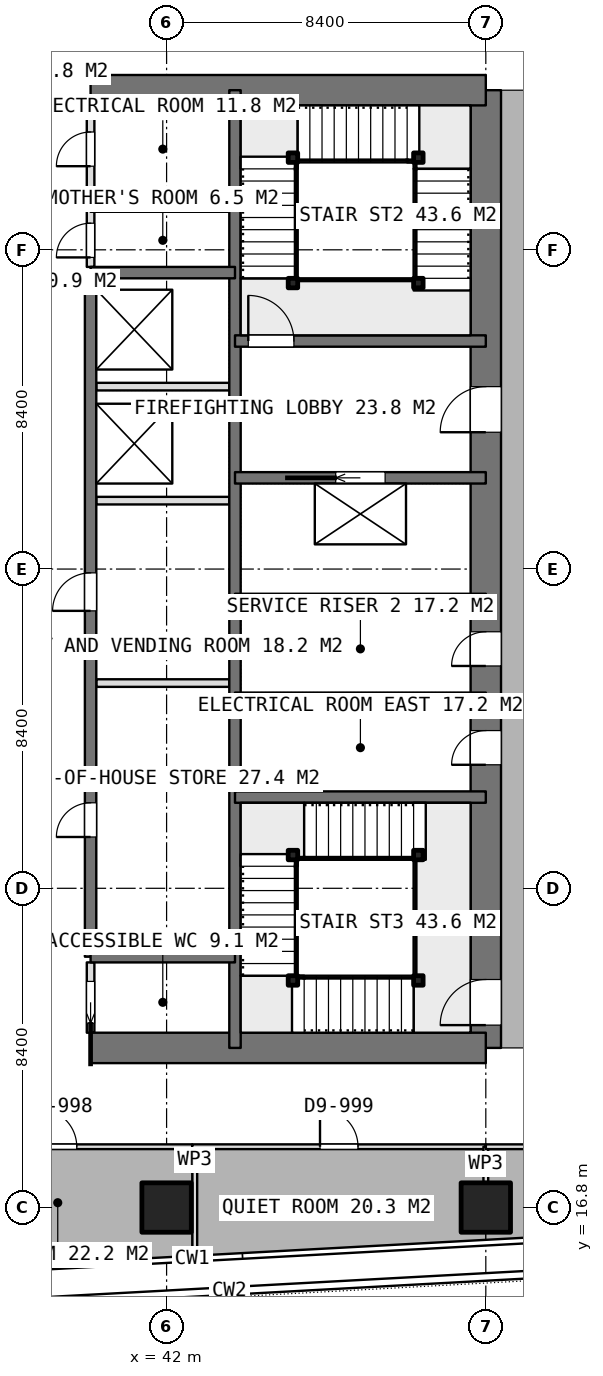
"""IFC4 building model, lengths in metres.
Left out: names, types, materials, properties, quantities, classifications, styles, units other than length and angle.
Written with IfcOpenShell. Run it as: python <this file> out.ifc"""

import sys

from ifc_helpers import new_model, si_unit, direction, frame, frame_2d, origin, origin_2d, place, context, subcontext, project, spatial, rectangle, extrude, element, fill, save


model = new_model("IFC4")
c1 = context("Model", 3, precision=1e-05, world=origin(), true_north=direction((0.0, 1.0)))
c2 = subcontext(c1, "Body", "Model", "MODEL_VIEW")
j1 = project(units=[si_unit("LENGTHUNIT", "METRE"), si_unit("PLANEANGLEUNIT", "RADIAN")], contexts=[c1])
p1 = place(None, origin())
s1 = spatial("IfcSite", under=j1, at=p1, CompositionType="ELEMENT")
p2 = place(p1, origin())
s2 = spatial("IfcBuilding", under=s1, at=p2, CompositionType="ELEMENT")
p3 = place(p2, frame((0.0, 0.0, 268.85)))
s3 = spatial("IfcBuildingStorey", under=s2, at=p3, CompositionType="ELEMENT", Elevation=268.85)
for number, where, z_axis, x_axis in (
    (1, (40.0, 21.0, 0.0), (0.0, 0.0, 1.0), (1.0, 0.0, 0.0)),
    (2, (40.0, 46.2, 0.0), (0.0, 0.0, 1.0), (1.0, 0.0, 0.0)),
):
    element("IfcWall", number, at=place(p3, frame(where, z_axis=z_axis, x_axis=x_axis)), inside=s3, PredefinedType="SHEAR", context=c2, shape_type="SweptSolid", body=[
        extrude(rectangle(XDim=10.4, YDim=0.8, at=frame_2d((5.2, 0.0))), origin(), (0.0, 0.0, 1.0), 3.75),
    ])
p4 = place(p3, frame((50.4, 21.0, 0.0), z_axis=(0.0, 0.0, 1.0), x_axis=(0.0, 1.0, 0.0)))
e3 = element("IfcWall", 3, at=p4, inside=s3, PredefinedType="SHEAR", context=c2, shape_type="SweptSolid", body=[
    extrude(rectangle(XDim=25.2, YDim=0.8, at=frame_2d((12.6, 0.0))), origin(), (0.0, 0.0, 1.0), 3.75),
])
p5 = place(p4, frame((16.2, 0.0, 0.0)))
e4 = element("IfcOpeningElement", 4, at=p5, cuts=e3, PredefinedType="OPENING", context=c2, shape_type="SweptSolid", body=[
    extrude(rectangle(XDim=1.2, YDim=2.1, at=frame_2d((0.6, 1.05))), frame((0.0, 0.41, 0.0), z_axis=(0.0, -1.0, 0.0), x_axis=(1.0, 0.0, 0.0)), (0.0, 0.0, 1.0), 0.82),
])
p6 = place(p4, frame((10.05, 0.0, 0.0)))
e5 = element("IfcOpeningElement", 5, at=p6, cuts=e3, PredefinedType="OPENING", context=c2, shape_type="SweptSolid", body=[
    extrude(rectangle(XDim=0.9, YDim=2.1, at=frame_2d((0.45, 1.05))), frame((0.0, 0.41, 0.0), z_axis=(0.0, -1.0, 0.0), x_axis=(1.0, 0.0, 0.0)), (0.0, 0.0, 1.0), 0.82),
])
p7 = place(p4, frame((7.45, 0.0, 0.0)))
e6 = element("IfcOpeningElement", 6, at=p7, cuts=e3, PredefinedType="OPENING", context=c2, shape_type="SweptSolid", body=[
    extrude(rectangle(XDim=0.9, YDim=2.1, at=frame_2d((0.45, 1.05))), frame((0.0, 0.41, 0.0), z_axis=(0.0, -1.0, 0.0), x_axis=(1.0, 0.0, 0.0)), (0.0, 0.0, 1.0), 0.82),
])
p8 = place(p4, frame((0.6, 0.0, 0.0)))
e7 = element("IfcOpeningElement", 7, at=p8, cuts=e3, PredefinedType="OPENING", context=c2, shape_type="SweptSolid", body=[
    extrude(rectangle(XDim=1.2, YDim=2.1, at=frame_2d((0.6, 1.05))), frame((0.0, 0.41, 0.0), z_axis=(0.0, -1.0, 0.0), x_axis=(1.0, 0.0, 0.0)), (0.0, 0.0, 1.0), 0.82),
])
p9 = place(p3, frame((43.8, 21.0, 0.0), z_axis=(0.0, 0.0, 1.0), x_axis=(0.0, 1.0, 0.0)))
e8 = element("IfcWall", 8, at=p9, inside=s3, PredefinedType="SHEAR", context=c2, shape_type="SweptSolid", body=[
    extrude(rectangle(XDim=25.2, YDim=0.3, at=frame_2d((12.6, 0.0))), origin(), (0.0, 0.0, 1.0), 3.75),
])
p10 = place(p3, frame((40.0, 23.4, 0.0), z_axis=(0.0, 0.0, 1.0), x_axis=(0.0, 1.0, 0.0)))
e9 = element("IfcWall", 9, at=p10, inside=s3, PredefinedType="SHEAR", context=c2, shape_type="SweptSolid", body=[
    extrude(rectangle(XDim=18.0, YDim=0.3, at=frame_2d((9.0, 0.0))), origin(), (0.0, 0.0, 1.0), 3.75),
])
p11 = place(p10, frame((3.15, 0.0, 0.0)))
e10 = element("IfcOpeningElement", 10, at=p11, cuts=e9, PredefinedType="OPENING", context=c2, shape_type="SweptSolid", body=[
    extrude(rectangle(XDim=0.9, YDim=2.1, at=frame_2d((0.45, 1.05))), frame((0.0, 0.16, 0.0), z_axis=(0.0, -1.0, 0.0), x_axis=(1.0, 0.0, 0.0)), (0.0, 0.0, 1.0), 0.32),
])
p12 = place(p10, frame((9.1, 0.0, 0.0)))
e11 = element("IfcOpeningElement", 11, at=p12, cuts=e9, PredefinedType="OPENING", context=c2, shape_type="SweptSolid", body=[
    extrude(rectangle(XDim=1.0, YDim=2.1, at=frame_2d((0.5, 1.05))), frame((0.0, 0.16, 0.0), z_axis=(0.0, -1.0, 0.0), x_axis=(1.0, 0.0, 0.0)), (0.0, 0.0, 1.0), 0.32),
])
for number, where, z_axis, x_axis in (
    (12, (40.0, 23.4, 0.0), (0.0, 0.0, 1.0), (1.0, 0.0, 0.0)),
    (13, (40.0, 41.4, 0.0), (0.0, 0.0, 1.0), (1.0, 0.0, 0.0)),
):
    element("IfcWall", number, at=place(p3, frame(where, z_axis=z_axis, x_axis=x_axis)), inside=s3, PredefinedType="SHEAR", context=c2, shape_type="SweptSolid", body=[
        extrude(rectangle(XDim=3.8, YDim=0.3, at=frame_2d((1.9, 0.0))), origin(), (0.0, 0.0, 1.0), 3.75),
    ])
for number, where, z_axis, x_axis in (
    (14, (43.8, 27.6, 0.0), (0.0, 0.0, 1.0), (1.0, 0.0, 0.0)),
    (15, (43.8, 30.2, 0.0), (0.0, 0.0, 1.0), (1.0, 0.0, 0.0)),
    (16, (43.8, 32.8, 0.0), (0.0, 0.0, 1.0), (1.0, 0.0, 0.0)),
):
    element("IfcWall", number, at=place(p3, frame(where, z_axis=z_axis, x_axis=x_axis)), inside=s3, PredefinedType="SHEAR", context=c2, shape_type="SweptSolid", body=[
        extrude(rectangle(XDim=6.6, YDim=0.3, at=frame_2d((3.3, 0.0))), origin(), (0.0, 0.0, 1.0), 3.75),
    ])
p13 = place(p3, frame((43.8, 36.0, 0.0), z_axis=(0.0, 0.0, 1.0), x_axis=(1.0, 0.0, 0.0)))
e17 = element("IfcWall", 17, at=p13, inside=s3, PredefinedType="SHEAR", context=c2, shape_type="SweptSolid", body=[
    extrude(rectangle(XDim=6.6, YDim=0.3, at=frame_2d((3.3, 0.0))), origin(), (0.0, 0.0, 1.0), 3.75),
])
p14 = place(p13, frame((2.65, 0.0, 0.0)))
e18 = element("IfcOpeningElement", 18, at=p14, cuts=e17, PredefinedType="OPENING", context=c2, shape_type="SweptSolid", body=[
    extrude(rectangle(XDim=1.3, YDim=2.1, at=frame_2d((0.65, 1.05))), frame((0.0, 0.16, 0.0), z_axis=(0.0, -1.0, 0.0), x_axis=(1.0, 0.0, 0.0)), (0.0, 0.0, 1.0), 0.32),
])
p15 = place(p3, frame((43.8, 39.6, 0.0), z_axis=(0.0, 0.0, 1.0), x_axis=(1.0, 0.0, 0.0)))
e19 = element("IfcWall", 19, at=p15, inside=s3, PredefinedType="SHEAR", context=c2, shape_type="SweptSolid", body=[
    extrude(rectangle(XDim=6.6, YDim=0.3, at=frame_2d((3.3, 0.0))), origin(), (0.0, 0.0, 1.0), 3.75),
])
p16 = place(p15, frame((0.35, 0.0, 0.0)))
e20 = element("IfcOpeningElement", 20, at=p16, cuts=e19, PredefinedType="OPENING", context=c2, shape_type="SweptSolid", body=[
    extrude(rectangle(XDim=1.2, YDim=2.1, at=frame_2d((0.6, 1.05))), frame((0.0, 0.16, 0.0), z_axis=(0.0, -1.0, 0.0), x_axis=(1.0, 0.0, 0.0)), (0.0, 0.0, 1.0), 0.32),
])
for number, where, z_axis, x_axis in (
    (21, (42.0, 16.8, 0.0), (0.0, 0.0, 1.0), (1.0, 0.0, 0.0)),
    (22, (50.4, 16.8, 0.0), (0.0, 0.0, 1.0), (1.0, 0.0, 0.0)),
):
    element("IfcColumn", number, at=place(p3, frame(where, z_axis=z_axis, x_axis=x_axis)), inside=s3, PredefinedType="COLUMN", context=c2, shape_type="SweptSolid", body=[
        extrude(rectangle(XDim=1.3, YDim=1.3, at=origin_2d()), origin(), (0.0, 0.0, 1.0), 3.75),
    ])
for number, where, z_axis, x_axis in (
    (23, (40.15, 35.4, 0.0), (0.0, 0.0, 1.0), (1.0, 0.0, 0.0)),
    (24, (40.15, 38.4, 0.0), (0.0, 0.0, 1.0), (1.0, 0.0, 0.0)),
):
    element("IfcWall", number, at=place(p3, frame(where, z_axis=z_axis, x_axis=x_axis)), inside=s3, PredefinedType="PARTITIONING", context=c2, shape_type="SweptSolid", body=[
        extrude(rectangle(XDim=3.5, YDim=0.2, at=frame_2d((1.75, 0.0))), origin(), (0.0, 0.0, 1.0), 3.5),
    ])
p17 = place(p3, frame((40.0, 21.4, 0.0), z_axis=(0.0, 0.0, 1.0), x_axis=(0.0, 1.0, 0.0)))
e25 = element("IfcWall", 25, at=p17, inside=s3, PredefinedType="PARTITIONING", context=c2, shape_type="SweptSolid", body=[
    extrude(rectangle(XDim=1.85, YDim=0.2, at=frame_2d((0.925, 0.0))), origin(), (0.0, 0.0, 1.0), 3.5),
])
p18 = place(p17, frame((0.25, 0.0, 0.0)))
e26 = element("IfcOpeningElement", 26, at=p18, cuts=e25, PredefinedType="OPENING", context=c2, shape_type="SweptSolid", body=[
    extrude(rectangle(XDim=1.1, YDim=2.1, at=frame_2d((0.55, 1.05))), frame((0.0, 0.11, 0.0), z_axis=(0.0, -1.0, 0.0), x_axis=(1.0, 0.0, 0.0)), (0.0, 0.0, 1.0), 0.22),
])
p19 = place(p3, frame((40.0, 41.55, 0.0), z_axis=(0.0, 0.0, 1.0), x_axis=(0.0, 1.0, 0.0)))
e27 = element("IfcWall", 27, at=p19, inside=s3, PredefinedType="PARTITIONING", context=c2, shape_type="SweptSolid", body=[
    extrude(rectangle(XDim=4.25, YDim=0.2, at=frame_2d((2.125, 0.0))), origin(), (0.0, 0.0, 1.0), 3.5),
])
p20 = place(p19, frame((2.65, 0.0, 0.0)))
e28 = element("IfcOpeningElement", 28, at=p20, cuts=e27, PredefinedType="OPENING", context=c2, shape_type="SweptSolid", body=[
    extrude(rectangle(XDim=0.9, YDim=2.1, at=frame_2d((0.45, 1.05))), frame((0.0, 0.11, 0.0), z_axis=(0.0, -1.0, 0.0), x_axis=(1.0, 0.0, 0.0)), (0.0, 0.0, 1.0), 0.22),
])
p21 = place(p19, frame((0.25, 0.0, 0.0)))
e29 = element("IfcOpeningElement", 29, at=p21, cuts=e27, PredefinedType="OPENING", context=c2, shape_type="SweptSolid", body=[
    extrude(rectangle(XDim=0.9, YDim=2.1, at=frame_2d((0.45, 1.05))), frame((0.0, 0.11, 0.0), z_axis=(0.0, -1.0, 0.0), x_axis=(1.0, 0.0, 0.0)), (0.0, 0.0, 1.0), 0.22),
])
p22 = place(p3, frame((40.15, 30.6, 0.0), z_axis=(0.0, 0.0, 1.0), x_axis=(1.0, 0.0, 0.0)))
e30 = element("IfcWall", 30, at=p22, inside=s3, PredefinedType="PARTITIONING", context=c2, shape_type="SweptSolid", body=[
    extrude(rectangle(XDim=3.5, YDim=0.2, at=frame_2d((1.75, 0.0))), origin(), (0.0, 0.0, 1.0), 3.5),
])
p23 = place(p3, frame((40.0, 43.1, 0.0), z_axis=(0.0, 0.0, 1.0), x_axis=(1.0, 0.0, 0.0)))
e31 = element("IfcWall", 31, at=p23, inside=s3, PredefinedType="PARTITIONING", context=c2, shape_type="SweptSolid", body=[
    extrude(rectangle(XDim=3.65, YDim=0.2, at=frame_2d((1.825, 0.0))), origin(), (0.0, 0.0, 1.0), 3.5),
])
p24 = place(p3, frame((35.599, 18.4, 0.0), z_axis=(0.0, 0.0, 1.0), x_axis=(1.0, 0.0, 0.0)))
e32 = element("IfcWall", 32, at=p24, inside=s3, PredefinedType="PARTITIONING", context=c2, shape_type="SweptSolid", body=[
    extrude(rectangle(XDim=7.074, YDim=0.125, at=frame_2d((3.537, 0.0))), origin(), (0.0, 0.0, 1.0), 3.5),
])
p25 = place(p24, frame((3.037, 0.0, 0.0)))
e33 = element("IfcOpeningElement", 33, at=p25, cuts=e32, PredefinedType="OPENING", context=c2, shape_type="SweptSolid", body=[
    extrude(rectangle(XDim=1.0, YDim=2.1, at=frame_2d((0.5, 1.05))), frame((0.0, 0.073, 0.0), z_axis=(0.0, -1.0, 0.0), x_axis=(1.0, 0.0, 0.0)), (0.0, 0.0, 1.0), 0.145),
])
p26 = place(p3, frame((42.742, 18.337, 0.0), z_axis=(0.0, 0.0, 1.0), x_axis=(0.0, -1.0, 0.0)))
e34 = element("IfcWall", 34, at=p26, inside=s3, PredefinedType="PARTITIONING", context=c2, shape_type="SweptSolid", body=[
    extrude(rectangle(XDim=2.799, YDim=0.125, at=frame_2d((1.399, 0.0))), origin(), (0.0, 0.0, 1.0), 3.5),
])
p27 = place(p3, frame((42.674, 18.4, 0.0), z_axis=(0.0, 0.0, 1.0), x_axis=(1.0, 0.0, 0.0)))
e35 = element("IfcWall", 35, at=p27, inside=s3, PredefinedType="PARTITIONING", context=c2, shape_type="SweptSolid", body=[
    extrude(rectangle(XDim=7.726, YDim=0.125, at=frame_2d((3.863, 0.0))), origin(), (0.0, 0.0, 1.0), 3.5),
])
p28 = place(p27, frame((3.363, 0.0, 0.0)))
e36 = element("IfcOpeningElement", 36, at=p28, cuts=e35, PredefinedType="OPENING", context=c2, shape_type="SweptSolid", body=[
    extrude(rectangle(XDim=1.0, YDim=2.1, at=frame_2d((0.5, 1.05))), frame((0.0, 0.073, 0.0), z_axis=(0.0, -1.0, 0.0), x_axis=(1.0, 0.0, 0.0)), (0.0, 0.0, 1.0), 0.145),
])
p29 = place(p3, frame((50.4, 18.4, 0.0), z_axis=(0.0, 0.0, 1.0), x_axis=(0.0, -1.0, 0.0)))
e37 = element("IfcWall", 37, at=p29, inside=s3, PredefinedType="PARTITIONING", context=c2, shape_type="SweptSolid", body=[
    extrude(rectangle(XDim=0.93, YDim=0.125, at=frame_2d((0.465, 0.0))), origin(), (0.0, 0.0, 1.0), 3.5),
])
p30 = place(p3, frame((50.401, 18.4, 0.0), z_axis=(0.0, 0.0, 1.0), x_axis=(1.0, 0.0, 0.0)))
e38 = element("IfcWall", 38, at=p30, inside=s3, PredefinedType="PARTITIONING", context=c2, shape_type="SweptSolid", body=[
    extrude(rectangle(XDim=5.999, YDim=0.125, at=frame_2d((3.0, 0.0))), origin(), (0.0, 0.0, 1.0), 3.5),
])
p31 = place(p30, frame((2.499, 0.0, 0.0)))
e39 = element("IfcOpeningElement", 39, at=p31, cuts=e38, PredefinedType="OPENING", context=c2, shape_type="SweptSolid", body=[
    extrude(rectangle(XDim=1.0, YDim=2.1, at=frame_2d((0.5, 1.05))), frame((0.0, 0.073, 0.0), z_axis=(0.0, -1.0, 0.0), x_axis=(1.0, 0.0, 0.0)), (0.0, 0.0, 1.0), 0.145),
])
for number, where, z_axis, x_axis in (
    (40, (45.325, 41.125, 0.0), (0.0, 0.0, 1.0), (1.0, 0.0, 0.0)),
    (41, (45.325, 44.425, 0.0), (0.0, 0.0, 1.0), (1.0, 0.0, 0.0)),
    (42, (48.625, 44.425, 0.0), (0.0, 0.0, 1.0), (1.0, 0.0, 0.0)),
    (43, (48.625, 41.125, 0.0), (0.0, 0.0, 1.0), (1.0, 0.0, 0.0)),
    (44, (48.625, 22.775, 0.0), (0.0, 0.0, 1.0), (1.0, 0.0, 0.0)),
    (45, (45.325, 22.775, 0.0), (0.0, 0.0, 1.0), (1.0, 0.0, 0.0)),
    (46, (45.325, 26.075, 0.0), (0.0, 0.0, 1.0), (1.0, 0.0, 0.0)),
    (47, (48.625, 26.075, 0.0), (0.0, 0.0, 1.0), (1.0, 0.0, 0.0)),
):
    element("IfcColumn", number, at=place(p3, frame(where, z_axis=z_axis, x_axis=x_axis)), inside=s3, PredefinedType="COLUMN", context=c2, shape_type="SweptSolid", body=[
        extrude(rectangle(XDim=0.25, YDim=0.25, at=origin_2d()), origin(), (0.0, 0.0, 1.0), 3.75),
    ])
p32 = place(p5, origin())
e48 = element("IfcDoor", 48, at=p32, inside=s3, OperationType="SINGLE_SWING_LEFT", PredefinedType="DOOR", context=c2, shape_type="SweptSolid", body=[
    extrude(rectangle(XDim=1.2, YDim=2.1, at=frame_2d((0.6, 1.05))), frame((0.0, 0.025, 0.0), z_axis=(0.0, -1.0, 0.0), x_axis=(1.0, 0.0, 0.0)), (0.0, 0.0, 1.0), 0.05),
])
fill(e4, e48)
p33 = place(p6, origin())
e49 = element("IfcDoor", 49, at=p33, inside=s3, OperationType="SINGLE_SWING_LEFT", PredefinedType="DOOR", context=c2, shape_type="SweptSolid", body=[
    extrude(rectangle(XDim=0.9, YDim=2.1, at=frame_2d((0.45, 1.05))), frame((0.0, 0.025, 0.0), z_axis=(0.0, -1.0, 0.0), x_axis=(1.0, 0.0, 0.0)), (0.0, 0.0, 1.0), 0.05),
])
fill(e5, e49)
p34 = place(p7, origin())
e50 = element("IfcDoor", 50, at=p34, inside=s3, OperationType="SINGLE_SWING_LEFT", PredefinedType="DOOR", context=c2, shape_type="SweptSolid", body=[
    extrude(rectangle(XDim=0.9, YDim=2.1, at=frame_2d((0.45, 1.05))), frame((0.0, 0.025, 0.0), z_axis=(0.0, -1.0, 0.0), x_axis=(1.0, 0.0, 0.0)), (0.0, 0.0, 1.0), 0.05),
])
fill(e6, e50)
p35 = place(p18, origin())
e51 = element("IfcDoor", 51, at=p35, inside=s3, OperationType="SLIDING_TO_LEFT", PredefinedType="DOOR", context=c2, shape_type="SweptSolid", body=[
    extrude(rectangle(XDim=1.1, YDim=2.1, at=frame_2d((0.55, 1.05))), frame((0.0, 0.025, 0.0), z_axis=(0.0, -1.0, 0.0), x_axis=(1.0, 0.0, 0.0)), (0.0, 0.0, 1.0), 0.05),
])
fill(e26, e51)
p36 = place(p20, origin())
e52 = element("IfcDoor", 52, at=p36, inside=s3, OperationType="SINGLE_SWING_LEFT", PredefinedType="DOOR", context=c2, shape_type="SweptSolid", body=[
    extrude(rectangle(XDim=0.9, YDim=2.1, at=frame_2d((0.45, 1.05))), frame((0.0, 0.025, 0.0), z_axis=(0.0, -1.0, 0.0), x_axis=(1.0, 0.0, 0.0)), (0.0, 0.0, 1.0), 0.05),
])
fill(e28, e52)
p37 = place(p21, origin())
e53 = element("IfcDoor", 53, at=p37, inside=s3, OperationType="SINGLE_SWING_LEFT", PredefinedType="DOOR", context=c2, shape_type="SweptSolid", body=[
    extrude(rectangle(XDim=0.9, YDim=2.1, at=frame_2d((0.45, 1.05))), frame((0.0, 0.025, 0.0), z_axis=(0.0, -1.0, 0.0), x_axis=(1.0, 0.0, 0.0)), (0.0, 0.0, 1.0), 0.05),
])
fill(e29, e53)
p38 = place(p11, origin())
e54 = element("IfcDoor", 54, at=p38, inside=s3, OperationType="SINGLE_SWING_LEFT", PredefinedType="DOOR", context=c2, shape_type="SweptSolid", body=[
    extrude(rectangle(XDim=0.9, YDim=2.1, at=frame_2d((0.45, 1.05))), frame((0.0, 0.025, 0.0), z_axis=(0.0, -1.0, 0.0), x_axis=(1.0, 0.0, 0.0)), (0.0, 0.0, 1.0), 0.05),
])
fill(e10, e54)
p39 = place(p12, origin())
e55 = element("IfcDoor", 55, at=p39, inside=s3, OperationType="SINGLE_SWING_LEFT", PredefinedType="DOOR", context=c2, shape_type="SweptSolid", body=[
    extrude(rectangle(XDim=1.0, YDim=2.1, at=frame_2d((0.5, 1.05))), frame((0.0, 0.025, 0.0), z_axis=(0.0, -1.0, 0.0), x_axis=(1.0, 0.0, 0.0)), (0.0, 0.0, 1.0), 0.05),
])
fill(e11, e55)
p40 = place(p14, origin())
e56 = element("IfcDoor", 56, at=p40, inside=s3, OperationType="SLIDING_TO_LEFT", PredefinedType="USERDEFINED", context=c2, shape_type="SweptSolid", body=[
    extrude(rectangle(XDim=1.3, YDim=2.1, at=frame_2d((0.65, 1.05))), frame((0.0, 0.025, 0.0), z_axis=(0.0, -1.0, 0.0), x_axis=(1.0, 0.0, 0.0)), (0.0, 0.0, 1.0), 0.05),
])
fill(e18, e56)
p41 = place(p25, origin())
e57 = element("IfcDoor", 57, at=p41, inside=s3, OperationType="SINGLE_SWING_LEFT", PredefinedType="DOOR", context=c2, shape_type="SweptSolid", body=[
    extrude(rectangle(XDim=1.0, YDim=2.1, at=frame_2d((0.5, 1.05))), frame((0.0, 0.025, 0.0), z_axis=(0.0, -1.0, 0.0), x_axis=(1.0, 0.0, 0.0)), (0.0, 0.0, 1.0), 0.05),
])
fill(e33, e57)
p42 = place(p28, origin())
e58 = element("IfcDoor", 58, at=p42, inside=s3, OperationType="SINGLE_SWING_LEFT", PredefinedType="DOOR", context=c2, shape_type="SweptSolid", body=[
    extrude(rectangle(XDim=1.0, YDim=2.1, at=frame_2d((0.5, 1.05))), frame((0.0, 0.025, 0.0), z_axis=(0.0, -1.0, 0.0), x_axis=(1.0, 0.0, 0.0)), (0.0, 0.0, 1.0), 0.05),
])
fill(e36, e58)
p43 = place(p16, origin())
e59 = element("IfcDoor", 59, at=p43, inside=s3, OperationType="SINGLE_SWING_RIGHT", PredefinedType="DOOR", context=c2, shape_type="SweptSolid", body=[
    extrude(rectangle(XDim=1.2, YDim=2.1, at=frame_2d((0.6, 1.05))), frame((0.0, 0.025, 0.0), z_axis=(0.0, -1.0, 0.0), x_axis=(1.0, 0.0, 0.0)), (0.0, 0.0, 1.0), 0.05),
])
fill(e20, e59)
p44 = place(p8, origin())
e60 = element("IfcDoor", 60, at=p44, inside=s3, OperationType="SINGLE_SWING_RIGHT", PredefinedType="DOOR", context=c2, shape_type="SweptSolid", body=[
    extrude(rectangle(XDim=1.2, YDim=2.1, at=frame_2d((0.6, 1.05))), frame((0.0, 0.025, 0.0), z_axis=(0.0, -1.0, 0.0), x_axis=(1.0, 0.0, 0.0)), (0.0, 0.0, 1.0), 0.05),
])
fill(e7, e60)
save(model, sys.argv[1])
